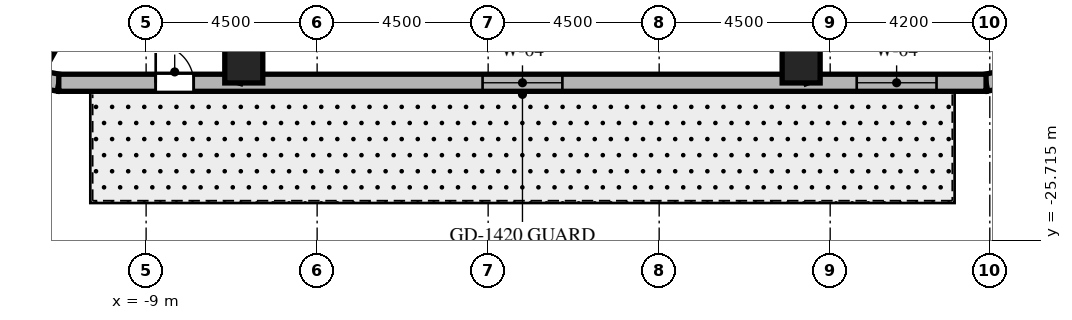
"""IFC4 building model, lengths in metres.
Left out: names, types, materials, properties, quantities, classifications, styles, units other than length and angle.
Written with IfcOpenShell. Run it as: python <this file> out.ifc"""

import sys

from ifc_helpers import new_model, si_unit, direction, frame, frame_2d, origin, origin_2d, place, context, subcontext, project, spatial, rectangle, extrude, element, fill, save


model = new_model("IFC4")
c1 = context("Model", 3, precision=1e-05, world=origin(), true_north=direction((0.0, 1.0)))
c2 = subcontext(c1, "Body", "Model", "MODEL_VIEW")
j1 = project(units=[si_unit("LENGTHUNIT", "METRE"), si_unit("PLANEANGLEUNIT", "RADIAN")], contexts=[c1])
p1 = place(None, origin())
s1 = spatial("IfcSite", under=j1, at=p1, CompositionType="ELEMENT")
p2 = place(p1, origin())
s2 = spatial("IfcBuilding", under=s1, at=p2, CompositionType="ELEMENT")
p3 = place(p2, frame((0.0, 0.0, 225.5)))
s3 = spatial("IfcBuildingStorey", under=s2, at=p3, CompositionType="ELEMENT", Elevation=225.5)
for number, where, z_axis, x_axis in (
    (1, (-6.43, -21.08, 0.0), (0.0, 0.0, 1.0), (1.0, 0.0, 0.0)),
    (2, (8.236, -21.08, 0.0), (0.0, 0.0, 1.0), (1.0, 0.0, 0.0)),
):
    element("IfcColumn", number, at=place(p3, frame(where, z_axis=z_axis, x_axis=x_axis)), inside=s3, PredefinedType="COLUMN", context=c2, shape_type="SweptSolid", body=[
        extrude(rectangle(XDim=1.0, YDim=1.0, at=origin_2d()), origin(), (0.0, 0.0, 1.0), 3.8),
    ])
p4 = place(p3, frame((-12.546, -21.34, 0.0), z_axis=(0.0, 0.0, 1.0), x_axis=(0.982686750835, -0.18527479519, 0.0)))
e3 = element("IfcWall", 3, at=p4, inside=s3, PredefinedType="SOLIDWALL", context=c2, shape_type="SweptSolid", body=[
    extrude(rectangle(XDim=1.27, YDim=0.45, at=frame_2d((0.635, 0.0))), origin(), (0.0, 0.0, 1.0), 3.5),
])
p5 = place(p3, frame((13.102, -21.575, 0.0), z_axis=(0.0, 0.0, 1.0), x_axis=(0.978757421505, 0.205021730188, 0.0)))
e4 = element("IfcWall", 4, at=p5, inside=s3, PredefinedType="SOLIDWALL", context=c2, shape_type="SweptSolid", body=[
    extrude(rectangle(XDim=1.406, YDim=0.45, at=frame_2d((0.703, 0.0))), origin(), (0.0, 0.0, 1.0), 3.5),
])
p6 = place(p3, frame((-11.298, -21.575, 0.0), z_axis=(0.0, 0.0, 1.0), x_axis=(1.0, 0.0, 0.0)))
e5 = element("IfcWall", 5, at=p6, inside=s3, PredefinedType="SOLIDWALL", context=c2, shape_type="SweptSolid", body=[
    extrude(rectangle(XDim=24.399, YDim=0.45, at=frame_2d((12.2, 0.0))), origin(), (0.0, 0.0, 1.0), 3.5),
])
p7 = place(p6, frame((2.55, 0.0, 0.0)))
e6 = element("IfcOpeningElement", 6, at=p7, cuts=e5, PredefinedType="OPENING", context=c2, shape_type="SweptSolid", body=[
    extrude(rectangle(XDim=1.0, YDim=2.15, at=frame_2d((0.5, 1.075))), frame((0.0, 0.235, 0.0), z_axis=(0.0, -1.0, 0.0), x_axis=(1.0, 0.0, 0.0)), (0.0, 0.0, 1.0), 0.47),
])
p8 = place(p6, frame((11.151, 0.0, 0.8)))
e7 = element("IfcOpeningElement", 7, at=p8, cuts=e5, PredefinedType="OPENING", context=c2, shape_type="SweptSolid", body=[
    extrude(rectangle(XDim=2.1, YDim=1.85, at=frame_2d((1.05, 0.925))), frame((0.0, 0.235, 0.0), z_axis=(0.0, -1.0, 0.0), x_axis=(1.0, 0.0, 0.0)), (0.0, 0.0, 1.0), 0.47),
])
p9 = place(p6, frame((20.996, 0.0, 0.8)))
e8 = element("IfcOpeningElement", 8, at=p9, cuts=e5, PredefinedType="OPENING", context=c2, shape_type="SweptSolid", body=[
    extrude(rectangle(XDim=2.1, YDim=1.85, at=frame_2d((1.05, 0.925))), frame((0.0, 0.235, 0.0), z_axis=(0.0, -1.0, 0.0), x_axis=(1.0, 0.0, 0.0)), (0.0, 0.0, 1.0), 0.47),
])
p10 = place(p3, frame((-5.451, -9.85, 0.0), z_axis=(0.0, 0.0, 1.0), x_axis=(-0.484188830955, -0.87496352837, 0.0)))
e9 = element("IfcWall", 9, at=p10, inside=s3, PredefinedType="PARTITIONING", context=c2, shape_type="SweptSolid", body=[
    extrude(rectangle(XDim=13.107, YDim=0.15, at=frame_2d((6.553, 0.0))), origin(), (0.0, 0.0, 1.0), 2.74),
])
p11 = place(p3, frame((-3.004, -9.85, 0.0), z_axis=(0.0, 0.0, 1.0), x_axis=(-0.291775760688, -0.956486751333, 0.0)))
e10 = element("IfcWall", 10, at=p11, inside=s3, PredefinedType="PARTITIONING", context=c2, shape_type="SweptSolid", body=[
    extrude(rectangle(XDim=12.258, YDim=0.15, at=frame_2d((6.129, 0.0))), origin(), (0.0, 0.0, 1.0), 2.74),
])
p12 = place(p3, frame((3.848, -9.85, 0.0), z_axis=(0.0, 0.0, 1.0), x_axis=(0.363921778212, -0.931429513889, 0.0)))
e11 = element("IfcWall", 11, at=p12, inside=s3, PredefinedType="PARTITIONING", context=c2, shape_type="SweptSolid", body=[
    extrude(rectangle(XDim=12.588, YDim=0.15, at=frame_2d((6.294, 0.0))), origin(), (0.0, 0.0, 1.0), 2.74),
])
p13 = place(p7, origin())
e12 = element("IfcDoor", 12, at=p13, inside=s3, OperationType="SINGLE_SWING_LEFT", PredefinedType="DOOR", context=c2, shape_type="SweptSolid", body=[
    extrude(rectangle(XDim=1.0, YDim=2.15, at=frame_2d((0.5, 1.075))), frame((0.0, 0.025, 0.0), z_axis=(0.0, -1.0, 0.0), x_axis=(1.0, 0.0, 0.0)), (0.0, 0.0, 1.0), 0.05),
])
fill(e6, e12)
p14 = place(p8, origin())
e13 = element("IfcWindow", 13, at=p14, inside=s3, PartitioningType="SINGLE_PANEL", PredefinedType="WINDOW", context=c2, shape_type="SweptSolid", body=[
    extrude(rectangle(XDim=2.1, YDim=1.85, at=frame_2d((1.05, 0.925))), frame((0.0, 0.03, 0.0), z_axis=(0.0, -1.0, 0.0), x_axis=(1.0, 0.0, 0.0)), (0.0, 0.0, 1.0), 0.06),
])
fill(e7, e13)
p15 = place(p9, origin())
e14 = element("IfcWindow", 14, at=p15, inside=s3, PartitioningType="SINGLE_PANEL", PredefinedType="WINDOW", context=c2, shape_type="SweptSolid", body=[
    extrude(rectangle(XDim=2.1, YDim=1.85, at=frame_2d((1.05, 0.925))), frame((0.0, 0.03, 0.0), z_axis=(0.0, -1.0, 0.0), x_axis=(1.0, 0.0, 0.0)), (0.0, 0.0, 1.0), 0.06),
])
fill(e8, e14)
save(model, sys.argv[1])
